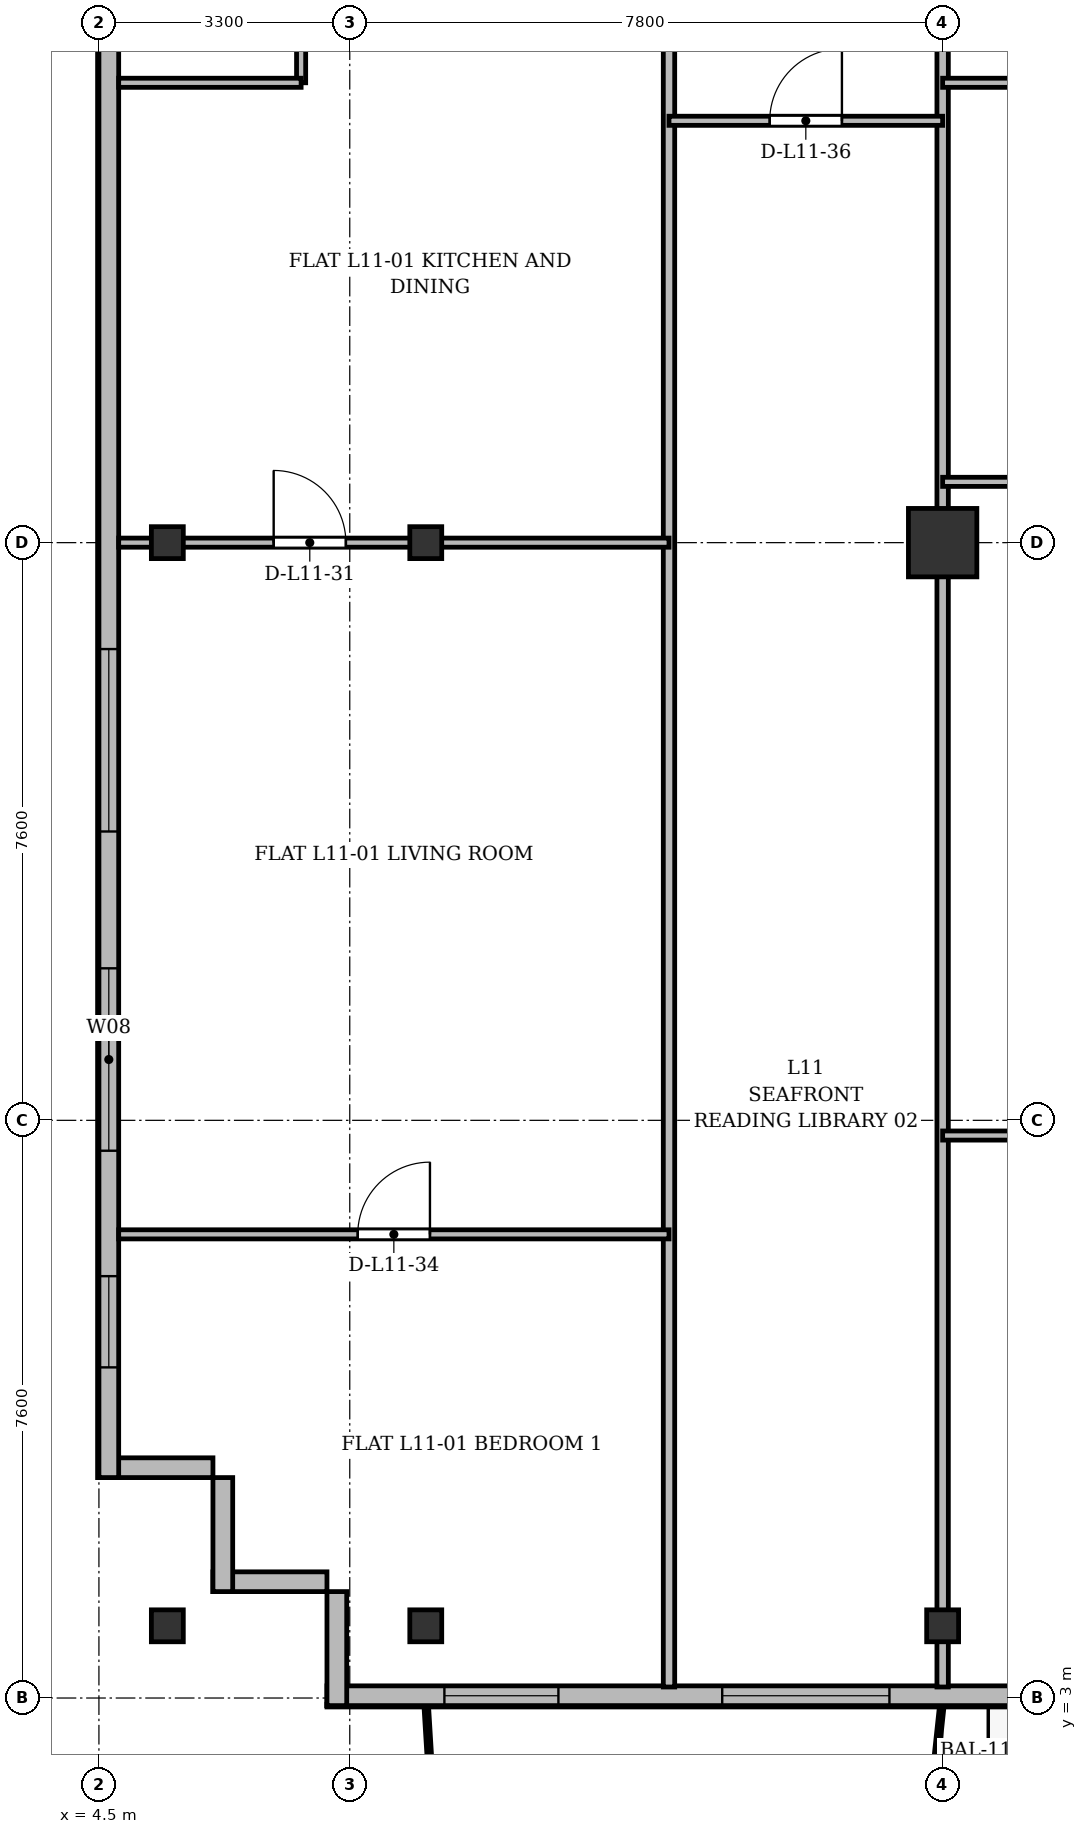
"""IFC4 building model, lengths in metres.
Left out: names, types, materials, properties, quantities, classifications, styles, units other than length and angle.
Written with IfcOpenShell. Run it as: python <this file> out.ifc"""

import sys

from ifc_helpers import new_model, si_unit, direction, frame, frame_2d, origin, origin_2d, place, context, subcontext, project, spatial, rectangle, i_section, extrude, source, transform, mapped, element, fill, save


model = new_model("IFC4")
c1 = context("Model", 3, precision=1e-05, world=origin(), true_north=direction((0.0, 1.0)))
c2 = subcontext(c1, "Body", "Model", "MODEL_VIEW")
j1 = project(units=[si_unit("LENGTHUNIT", "METRE"), si_unit("PLANEANGLEUNIT", "RADIAN")], contexts=[c1])
p1 = place(None, origin())
s1 = spatial("IfcSite", under=j1, at=p1, CompositionType="ELEMENT")
p2 = place(p1, origin())
s2 = spatial("IfcBuilding", under=s1, at=p2, CompositionType="ELEMENT")
p3 = place(p2, frame((0.0, 0.0, 45.1)))
s3 = spatial("IfcBuildingStorey", under=s2, at=p3, CompositionType="ELEMENT", Elevation=45.1)
m1 = source(origin(), c2, "Body", "SweptSolid", [
    extrude(i_section(OverallWidth=0.42, OverallDepth=0.42, WebThickness=0.026, FlangeThickness=0.04, at=origin_2d()), origin(), (0.0, 0.0, 1.0), 3.6),
])
for number, where, z_axis, x_axis in (
    (1, (5.4, 3.95, 0.0), (0.0, 0.0, 1.0), (1.0, 0.0, 0.0)),
    (2, (5.4, 18.2, 0.0), (0.0, 0.0, 1.0), (1.0, 0.0, 0.0)),
    (3, (8.8, 3.95, 0.0), (0.0, 0.0, 1.0), (1.0, 0.0, 0.0)),
    (4, (8.8, 18.2, 0.0), (0.0, 0.0, 1.0), (1.0, 0.0, 0.0)),
    (5, (15.6, 3.95, 0.0), (0.0, 0.0, 1.0), (1.0, 0.0, 0.0)),
):
    element("IfcColumn", number, at=place(p3, frame(where, z_axis=z_axis, x_axis=x_axis)), inside=s3, PredefinedType="COLUMN", context=c2, shape_type="MappedRepresentation", body=[
        mapped(m1, transform((0.0, 0.0, 0.0), x_axis=(1.0, 0.0, 0.0), y_axis=(0.0, 1.0, 0.0), z_axis=(0.0, 0.0, 1.0), scale=1.0)),
    ])
m2 = source(origin(), c2, "Body", "SweptSolid", [
    extrude(rectangle(XDim=0.9, YDim=0.9, at=origin_2d()), origin(), (0.0, 0.0, 1.0), 3.6),
])
p4 = place(p3, frame((15.6, 18.2, 0.0), z_axis=(0.0, 0.0, 1.0), x_axis=(1.0, 0.0, 0.0)))
e6 = element("IfcColumn", 6, at=p4, inside=s3, PredefinedType="COLUMN", context=c2, shape_type="MappedRepresentation", body=[
    mapped(m2, transform((0.0, 0.0, 0.0), x_axis=(1.0, 0.0, 0.0), y_axis=(0.0, 1.0, 0.0), z_axis=(0.0, 0.0, 1.0), scale=1.0)),
])
for number, where, z_axis, x_axis in (
    (7, (7.5, 4.53, 0.0), (0.0, 0.0, 1.0), (-1.0, 0.0, 0.0)),
    (8, (6.13, 4.4, 0.0), (0.0, 0.0, 1.0), (0.0, 1.0, 0.0)),
):
    element("IfcWall", number, at=place(p3, frame(where, z_axis=z_axis, x_axis=x_axis)), inside=s3, PredefinedType="SOLIDWALL", context=c2, shape_type="SweptSolid", body=[
        extrude(rectangle(XDim=1.5, YDim=0.26, at=frame_2d((0.75, 0.0))), origin(), (0.0, 0.0, 1.0), 3.34),
    ])
p5 = place(p3, frame((6.0, 6.03, 0.0), z_axis=(0.0, 0.0, 1.0), x_axis=(-1.0, 0.0, 0.0)))
e9 = element("IfcWall", 9, at=p5, inside=s3, PredefinedType="SOLIDWALL", context=c2, shape_type="SweptSolid", body=[
    extrude(rectangle(XDim=1.5, YDim=0.26, at=frame_2d((0.75, 0.0))), origin(), (0.0, 0.0, 1.0), 2.752),
])
p6 = place(p3, frame((4.63, 5.9, 0.0), z_axis=(0.0, 0.0, 1.0), x_axis=(0.0, 1.0, 0.0)))
e10 = element("IfcWall", 10, at=p6, inside=s3, PredefinedType="SOLIDWALL", context=c2, shape_type="SweptSolid", body=[
    extrude(rectangle(XDim=39.6, YDim=0.26, at=frame_2d((19.8, 0.0))), origin(), (0.0, 0.0, 1.0), 3.34),
])
p7 = place(p6, frame((1.45, 0.0, 0.92)))
e11 = element("IfcOpeningElement", 11, at=p7, cuts=e10, PredefinedType="OPENING", context=c2, shape_type="SweptSolid", body=[
    extrude(rectangle(XDim=1.2, YDim=1.65, at=frame_2d((0.6, 0.825))), frame((0.0, 0.14, 0.0), z_axis=(0.0, -1.0, 0.0), x_axis=(1.0, 0.0, 0.0)), (0.0, 0.0, 1.0), 0.28),
])
p8 = place(p6, frame((4.3, 0.0, 0.92)))
e12 = element("IfcOpeningElement", 12, at=p8, cuts=e10, PredefinedType="OPENING", context=c2, shape_type="SweptSolid", body=[
    extrude(rectangle(XDim=2.4, YDim=2.1, at=frame_2d((1.2, 1.05))), frame((0.0, 0.14, 0.0), z_axis=(0.0, -1.0, 0.0), x_axis=(1.0, 0.0, 0.0)), (0.0, 0.0, 1.0), 0.28),
])
p9 = place(p6, frame((8.5, 0.0, 0.92)))
e13 = element("IfcOpeningElement", 13, at=p9, cuts=e10, PredefinedType="OPENING", context=c2, shape_type="SweptSolid", body=[
    extrude(rectangle(XDim=2.4, YDim=2.1, at=frame_2d((1.2, 1.05))), frame((0.0, 0.14, 0.0), z_axis=(0.0, -1.0, 0.0), x_axis=(1.0, 0.0, 0.0)), (0.0, 0.0, 1.0), 0.28),
])
p10 = place(p6, frame((29.7, 0.0, 0.92)))
e14 = element("IfcOpeningElement", 14, at=p10, cuts=e10, PredefinedType="OPENING", context=c2, shape_type="SweptSolid", body=[
    extrude(rectangle(XDim=2.4, YDim=2.1, at=frame_2d((1.2, 1.05))), frame((0.0, 0.14, 0.0), z_axis=(0.0, -1.0, 0.0), x_axis=(1.0, 0.0, 0.0)), (0.0, 0.0, 1.0), 0.28),
])
p11 = place(p6, frame((33.9, 0.0, 0.92)))
e15 = element("IfcOpeningElement", 15, at=p11, cuts=e10, PredefinedType="OPENING", context=c2, shape_type="SweptSolid", body=[
    extrude(rectangle(XDim=1.2, YDim=1.65, at=frame_2d((0.6, 0.825))), frame((0.0, 0.14, 0.0), z_axis=(0.0, -1.0, 0.0), x_axis=(1.0, 0.0, 0.0)), (0.0, 0.0, 1.0), 0.28),
])
p12 = place(p6, frame((37.25, 0.0, 0.92)))
e16 = element("IfcOpeningElement", 16, at=p12, cuts=e10, PredefinedType="OPENING", context=c2, shape_type="SweptSolid", body=[
    extrude(rectangle(XDim=1.2, YDim=1.65, at=frame_2d((0.6, 0.825))), frame((0.0, 0.14, 0.0), z_axis=(0.0, -1.0, 0.0), x_axis=(1.0, 0.0, 0.0)), (0.0, 0.0, 1.0), 0.28),
])
p13 = place(p3, frame((66.9, 3.03, 0.0), z_axis=(0.0, 0.0, 1.0), x_axis=(-1.0, 0.0, 0.0)))
e17 = element("IfcWall", 17, at=p13, inside=s3, PredefinedType="SOLIDWALL", context=c2, shape_type="SweptSolid", body=[
    extrude(rectangle(XDim=59.4, YDim=0.26, at=frame_2d((29.7, 0.0))), origin(), (0.0, 0.0, 1.0), 3.34),
])
p14 = place(p13, frame((0.395, 0.0, 0.9)))
e18 = element("IfcOpeningElement", 18, at=p14, cuts=e17, PredefinedType="OPENING", context=c2, shape_type="SweptSolid", body=[
    extrude(rectangle(XDim=2.2, YDim=1.8, at=frame_2d((1.1, 0.9))), frame((0.0, 0.14, 0.0), z_axis=(0.0, -1.0, 0.0), x_axis=(1.0, 0.0, 0.0)), (0.0, 0.0, 1.0), 0.28),
])
p15 = place(p13, frame((4.75, 0.0, 0.9)))
e19 = element("IfcOpeningElement", 19, at=p15, cuts=e17, PredefinedType="OPENING", context=c2, shape_type="SweptSolid", body=[
    extrude(rectangle(XDim=1.5, YDim=1.75, at=frame_2d((0.75, 0.875))), frame((0.0, 0.14, 0.0), z_axis=(0.0, -1.0, 0.0), x_axis=(1.0, 0.0, 0.0)), (0.0, 0.0, 1.0), 0.28),
])
p16 = place(p13, frame((11.0, 0.0, 0.9)))
e20 = element("IfcOpeningElement", 20, at=p16, cuts=e17, PredefinedType="OPENING", context=c2, shape_type="SweptSolid", body=[
    extrude(rectangle(XDim=2.0, YDim=1.95, at=frame_2d((1.0, 0.975))), frame((0.0, 0.14, 0.0), z_axis=(0.0, -1.0, 0.0), x_axis=(1.0, 0.0, 0.0)), (0.0, 0.0, 1.0), 0.28),
])
p17 = place(p13, frame((17.007, 0.0, 0.0)))
e21 = element("IfcOpeningElement", 21, at=p17, cuts=e17, PredefinedType="OPENING", context=c2, shape_type="SweptSolid", body=[
    extrude(rectangle(XDim=1.2, YDim=2.2, at=frame_2d((0.6, 1.1))), frame((0.0, 0.14, 0.0), z_axis=(0.0, -1.0, 0.0), x_axis=(1.0, 0.0, 0.0)), (0.0, 0.0, 1.0), 0.28),
])
p18 = place(p13, frame((20.4, 0.0, 0.9)))
e22 = element("IfcOpeningElement", 22, at=p18, cuts=e17, PredefinedType="OPENING", context=c2, shape_type="SweptSolid", body=[
    extrude(rectangle(XDim=1.8, YDim=1.8, at=frame_2d((0.9, 0.9))), frame((0.0, 0.14, 0.0), z_axis=(0.0, -1.0, 0.0), x_axis=(1.0, 0.0, 0.0)), (0.0, 0.0, 1.0), 0.28),
])
p19 = place(p13, frame((24.4, 0.0, 0.9)))
e23 = element("IfcOpeningElement", 23, at=p19, cuts=e17, PredefinedType="OPENING", context=c2, shape_type="SweptSolid", body=[
    extrude(rectangle(XDim=2.2, YDim=1.8, at=frame_2d((1.1, 0.9))), frame((0.0, 0.14, 0.0), z_axis=(0.0, -1.0, 0.0), x_axis=(1.0, 0.0, 0.0)), (0.0, 0.0, 1.0), 0.28),
])
p20 = place(p13, frame((31.35, 0.0, 0.9)))
e24 = element("IfcOpeningElement", 24, at=p20, cuts=e17, PredefinedType="OPENING", context=c2, shape_type="SweptSolid", body=[
    extrude(rectangle(XDim=1.5, YDim=1.75, at=frame_2d((0.75, 0.875))), frame((0.0, 0.14, 0.0), z_axis=(0.0, -1.0, 0.0), x_axis=(1.0, 0.0, 0.0)), (0.0, 0.0, 1.0), 0.28),
])
p21 = place(p13, frame((38.9, 0.0, 0.9)))
e25 = element("IfcOpeningElement", 25, at=p21, cuts=e17, PredefinedType="OPENING", context=c2, shape_type="SweptSolid", body=[
    extrude(rectangle(XDim=2.0, YDim=1.95, at=frame_2d((1.0, 0.975))), frame((0.0, 0.14, 0.0), z_axis=(0.0, -1.0, 0.0), x_axis=(1.0, 0.0, 0.0)), (0.0, 0.0, 1.0), 0.28),
])
p22 = place(p13, frame((45.435, 0.0, 0.0)))
e26 = element("IfcOpeningElement", 26, at=p22, cuts=e17, PredefinedType="OPENING", context=c2, shape_type="SweptSolid", body=[
    extrude(rectangle(XDim=1.2, YDim=2.2, at=frame_2d((0.6, 1.1))), frame((0.0, 0.14, 0.0), z_axis=(0.0, -1.0, 0.0), x_axis=(1.0, 0.0, 0.0)), (0.0, 0.0, 1.0), 0.28),
])
p23 = place(p13, frame((48.45, 0.0, 0.9)))
e27 = element("IfcOpeningElement", 27, at=p23, cuts=e17, PredefinedType="OPENING", context=c2, shape_type="SweptSolid", body=[
    extrude(rectangle(XDim=1.8, YDim=1.8, at=frame_2d((0.9, 0.9))), frame((0.0, 0.14, 0.0), z_axis=(0.0, -1.0, 0.0), x_axis=(1.0, 0.0, 0.0)), (0.0, 0.0, 1.0), 0.28),
])
p24 = place(p13, frame((52.0, 0.0, 0.9)))
e28 = element("IfcOpeningElement", 28, at=p24, cuts=e17, PredefinedType="OPENING", context=c2, shape_type="SweptSolid", body=[
    extrude(rectangle(XDim=2.2, YDim=1.8, at=frame_2d((1.1, 0.9))), frame((0.0, 0.14, 0.0), z_axis=(0.0, -1.0, 0.0), x_axis=(1.0, 0.0, 0.0)), (0.0, 0.0, 1.0), 0.28),
])
p25 = place(p13, frame((56.355, 0.0, 0.9)))
e29 = element("IfcOpeningElement", 29, at=p25, cuts=e17, PredefinedType="OPENING", context=c2, shape_type="SweptSolid", body=[
    extrude(rectangle(XDim=1.5, YDim=1.75, at=frame_2d((0.75, 0.875))), frame((0.0, 0.14, 0.0), z_axis=(0.0, -1.0, 0.0), x_axis=(1.0, 0.0, 0.0)), (0.0, 0.0, 1.0), 0.28),
])
p26 = place(p3, frame((7.63, 2.9, 0.0), z_axis=(0.0, 0.0, 1.0), x_axis=(0.0, 1.0, 0.0)))
e30 = element("IfcWall", 30, at=p26, inside=s3, PredefinedType="SOLIDWALL", context=c2, shape_type="SweptSolid", body=[
    extrude(rectangle(XDim=1.5, YDim=0.26, at=frame_2d((0.75, 0.0))), origin(), (0.0, 0.0, 1.0), 2.69),
])
p27 = place(p3, frame((12.0, 3.145, 0.0), z_axis=(0.0, 0.0, 1.0), x_axis=(0.0, 1.0, 0.0)))
e31 = element("IfcWall", 31, at=p27, inside=s3, PredefinedType="PARTITIONING", context=c2, shape_type="SweptSolid", body=[
    extrude(rectangle(XDim=24.455, YDim=0.15, at=frame_2d((12.228, 0.0))), origin(), (0.0, 0.0, 1.0), 2.69),
])
p28 = place(p3, frame((15.6, 3.145, 0.0), z_axis=(0.0, 0.0, 1.0), x_axis=(0.0, 1.0, 0.0)))
e32 = element("IfcWall", 32, at=p28, inside=s3, PredefinedType="PARTITIONING", context=c2, shape_type="SweptSolid", body=[
    extrude(rectangle(XDim=24.455, YDim=0.15, at=frame_2d((12.228, 0.0))), origin(), (0.0, 0.0, 1.0), 2.752),
])
p29 = place(p3, frame((4.76, 18.2, 0.0), z_axis=(0.0, 0.0, 1.0), x_axis=(1.0, 0.0, 0.0)))
e33 = element("IfcWall", 33, at=p29, inside=s3, PredefinedType="PARTITIONING", context=c2, shape_type="SweptSolid", body=[
    extrude(rectangle(XDim=7.24, YDim=0.12, at=frame_2d((3.62, 0.0))), origin(), (0.0, 0.0, 1.0), 2.69),
])
p30 = place(p29, frame((2.039, 0.0, 0.0)))
e34 = element("IfcOpeningElement", 34, at=p30, cuts=e33, PredefinedType="OPENING", context=c2, shape_type="SweptSolid", body=[
    extrude(rectangle(XDim=0.95, YDim=2.15, at=frame_2d((0.475, 1.075))), frame((0.0, 0.07, 0.0), z_axis=(0.0, -1.0, 0.0), x_axis=(1.0, 0.0, 0.0)), (0.0, 0.0, 1.0), 0.14),
])
p31 = place(p3, frame((7.16, 24.25, 0.0), z_axis=(0.0, 0.0, 1.0), x_axis=(0.0, 1.0, 0.0)))
e35 = element("IfcWall", 35, at=p31, inside=s3, PredefinedType="PARTITIONING", context=c2, shape_type="SweptSolid", body=[
    extrude(rectangle(XDim=3.35, YDim=0.12, at=frame_2d((1.675, 0.0))), origin(), (0.0, 0.0, 1.0), 2.94),
])
p32 = place(p31, frame((0.8, 0.0, 0.0)))
e36 = element("IfcOpeningElement", 36, at=p32, cuts=e35, PredefinedType="OPENING", context=c2, shape_type="SweptSolid", body=[
    extrude(rectangle(XDim=0.85, YDim=2.1, at=frame_2d((0.425, 1.05))), frame((0.0, 0.07, 0.0), z_axis=(0.0, -1.0, 0.0), x_axis=(1.0, 0.0, 0.0)), (0.0, 0.0, 1.0), 0.14),
])
p33 = place(p3, frame((4.76, 24.25, 0.0), z_axis=(0.0, 0.0, 1.0), x_axis=(1.0, 0.0, 0.0)))
e37 = element("IfcWall", 37, at=p33, inside=s3, PredefinedType="PARTITIONING", context=c2, shape_type="SweptSolid", body=[
    extrude(rectangle(XDim=2.4, YDim=0.12, at=frame_2d((1.2, 0.0))), origin(), (0.0, 0.0, 1.0), 2.752),
])
p34 = place(p3, frame((4.76, 9.1, 0.0), z_axis=(0.0, 0.0, 1.0), x_axis=(1.0, 0.0, 0.0)))
e38 = element("IfcWall", 38, at=p34, inside=s3, PredefinedType="PARTITIONING", context=c2, shape_type="SweptSolid", body=[
    extrude(rectangle(XDim=7.24, YDim=0.12, at=frame_2d((3.62, 0.0))), origin(), (0.0, 0.0, 1.0), 2.752),
])
p35 = place(p34, frame((3.145, 0.0, 0.0)))
e39 = element("IfcOpeningElement", 39, at=p35, cuts=e38, PredefinedType="OPENING", context=c2, shape_type="SweptSolid", body=[
    extrude(rectangle(XDim=0.95, YDim=2.15, at=frame_2d((0.475, 1.075))), frame((0.0, 0.07, 0.0), z_axis=(0.0, -1.0, 0.0), x_axis=(1.0, 0.0, 0.0)), (0.0, 0.0, 1.0), 0.14),
])
p36 = place(p3, frame((12.0, 23.75, 0.0), z_axis=(0.0, 0.0, 1.0), x_axis=(1.0, 0.0, 0.0)))
e40 = element("IfcWall", 40, at=p36, inside=s3, PredefinedType="PARTITIONING", context=c2, shape_type="SweptSolid", body=[
    extrude(rectangle(XDim=3.6, YDim=0.12, at=frame_2d((1.8, 0.0))), origin(), (0.0, 0.0, 1.0), 2.752),
])
p37 = place(p36, frame((1.325, 0.0, 0.0)))
e41 = element("IfcOpeningElement", 41, at=p37, cuts=e40, PredefinedType="OPENING", context=c2, shape_type="SweptSolid", body=[
    extrude(rectangle(XDim=0.95, YDim=2.15, at=frame_2d((0.475, 1.075))), frame((0.0, 0.07, 0.0), z_axis=(0.0, -1.0, 0.0), x_axis=(1.0, 0.0, 0.0)), (0.0, 0.0, 1.0), 0.14),
])
p38 = place(p3, frame((15.6, 19.0, 0.0), z_axis=(0.0, 0.0, 1.0), x_axis=(1.0, 0.0, 0.0)))
e42 = element("IfcWall", 42, at=p38, inside=s3, PredefinedType="PARTITIONING", context=c2, shape_type="SweptSolid", body=[
    extrude(rectangle(XDim=7.8, YDim=0.12, at=frame_2d((3.9, 0.0))), origin(), (0.0, 0.0, 1.0), 2.752),
])
p39 = place(p38, frame((3.333, 0.0, 0.0)))
e43 = element("IfcOpeningElement", 43, at=p39, cuts=e42, PredefinedType="OPENING", context=c2, shape_type="SweptSolid", body=[
    extrude(rectangle(XDim=0.95, YDim=2.15, at=frame_2d((0.475, 1.075))), frame((0.0, 0.07, 0.0), z_axis=(0.0, -1.0, 0.0), x_axis=(1.0, 0.0, 0.0)), (0.0, 0.0, 1.0), 0.14),
])
p40 = place(p3, frame((15.6, 24.25, 0.0), z_axis=(0.0, 0.0, 1.0), x_axis=(1.0, 0.0, 0.0)))
e44 = element("IfcWall", 44, at=p40, inside=s3, PredefinedType="PARTITIONING", context=c2, shape_type="SweptSolid", body=[
    extrude(rectangle(XDim=2.4, YDim=0.12, at=frame_2d((1.2, 0.0))), origin(), (0.0, 0.0, 1.0), 2.752),
])
p41 = place(p3, frame((15.6, 10.4, 0.0), z_axis=(0.0, 0.0, 1.0), x_axis=(1.0, 0.0, 0.0)))
e45 = element("IfcWall", 45, at=p41, inside=s3, PredefinedType="PARTITIONING", context=c2, shape_type="SweptSolid", body=[
    extrude(rectangle(XDim=3.9, YDim=0.12, at=frame_2d((1.95, 0.0))), origin(), (0.0, 0.0, 1.0), 2.752),
])
p42 = place(p41, frame((1.475, 0.0, 0.0)))
e46 = element("IfcOpeningElement", 46, at=p42, cuts=e45, PredefinedType="OPENING", context=c2, shape_type="SweptSolid", body=[
    extrude(rectangle(XDim=0.95, YDim=2.15, at=frame_2d((0.475, 1.075))), frame((0.0, 0.07, 0.0), z_axis=(0.0, -1.0, 0.0), x_axis=(1.0, 0.0, 0.0)), (0.0, 0.0, 1.0), 0.14),
])
m3 = source(origin(), c2, "Body", "SweptSolid", [
    extrude(rectangle(XDim=1.2, YDim=1.65, at=frame_2d((0.6, 0.825))), frame((0.0, 0.03, 0.0), z_axis=(0.0, -1.0, 0.0), x_axis=(1.0, 0.0, 0.0)), (0.0, 0.0, 1.0), 0.06),
])
p43 = place(p7, origin())
e47 = element("IfcWindow", 47, at=p43, inside=s3, PartitioningType="SINGLE_PANEL", PredefinedType="WINDOW", context=c2, shape_type="MappedRepresentation", body=[
    mapped(m3, transform((0.0, 0.0, 0.0), x_axis=(1.0, 0.0, 0.0), y_axis=(0.0, 1.0, 0.0), z_axis=(0.0, 0.0, 1.0), scale=1.0)),
])
fill(e11, e47)
m4 = source(origin(), c2, "Body", "SweptSolid", [
    extrude(rectangle(XDim=2.4, YDim=2.1, at=frame_2d((1.2, 1.05))), frame((0.0, 0.03, 0.0), z_axis=(0.0, -1.0, 0.0), x_axis=(1.0, 0.0, 0.0)), (0.0, 0.0, 1.0), 0.06),
])
p44 = place(p8, origin())
e48 = element("IfcWindow", 48, at=p44, inside=s3, PartitioningType="SINGLE_PANEL", PredefinedType="WINDOW", context=c2, shape_type="MappedRepresentation", body=[
    mapped(m4, transform((0.0, 0.0, 0.0), x_axis=(1.0, 0.0, 0.0), y_axis=(0.0, 1.0, 0.0), z_axis=(0.0, 0.0, 1.0), scale=1.0)),
])
fill(e12, e48)
p45 = place(p9, origin())
e49 = element("IfcWindow", 49, at=p45, inside=s3, PartitioningType="SINGLE_PANEL", PredefinedType="WINDOW", context=c2, shape_type="MappedRepresentation", body=[
    mapped(m4, transform((0.0, 0.0, 0.0), x_axis=(1.0, 0.0, 0.0), y_axis=(0.0, 1.0, 0.0), z_axis=(0.0, 0.0, 1.0), scale=1.0)),
])
fill(e13, e49)
m5 = source(origin(), c2, "Body", "SweptSolid", [
    extrude(rectangle(XDim=2.2, YDim=1.8, at=frame_2d((1.1, 0.9))), frame((0.0, 0.03, 0.0), z_axis=(0.0, -1.0, 0.0), x_axis=(1.0, 0.0, 0.0)), (0.0, 0.0, 1.0), 0.06),
])
p46 = place(p24, origin())
e50 = element("IfcWindow", 50, at=p46, inside=s3, PartitioningType="SINGLE_PANEL", PredefinedType="WINDOW", context=c2, shape_type="MappedRepresentation", body=[
    mapped(m5, transform((0.0, 0.0, 0.0), x_axis=(1.0, 0.0, 0.0), y_axis=(0.0, 1.0, 0.0), z_axis=(0.0, 0.0, 1.0), scale=1.0)),
])
fill(e28, e50)
m6 = source(origin(), c2, "Body", "SweptSolid", [
    extrude(rectangle(XDim=1.5, YDim=1.75, at=frame_2d((0.75, 0.875))), frame((0.0, 0.03, 0.0), z_axis=(0.0, -1.0, 0.0), x_axis=(1.0, 0.0, 0.0)), (0.0, 0.0, 1.0), 0.06),
])
p47 = place(p25, origin())
e51 = element("IfcWindow", 51, at=p47, inside=s3, PartitioningType="SINGLE_PANEL", PredefinedType="WINDOW", context=c2, shape_type="MappedRepresentation", body=[
    mapped(m6, transform((0.0, 0.0, 0.0), x_axis=(1.0, 0.0, 0.0), y_axis=(0.0, 1.0, 0.0), z_axis=(0.0, 0.0, 1.0), scale=1.0)),
])
fill(e29, e51)
m7 = source(origin(), c2, "Body", "SweptSolid", [
    extrude(rectangle(XDim=0.95, YDim=2.15, at=frame_2d((0.475, 1.075))), frame((0.0, 0.025, 0.0), z_axis=(0.0, -1.0, 0.0), x_axis=(1.0, 0.0, 0.0)), (0.0, 0.0, 1.0), 0.05),
])
p48 = place(p30, origin())
e52 = element("IfcDoor", 52, at=p48, inside=s3, OperationType="SINGLE_SWING_LEFT", PredefinedType="DOOR", context=c2, shape_type="MappedRepresentation", body=[
    mapped(m7, transform((0.0, 0.0, 0.0), x_axis=(1.0, 0.0, 0.0), y_axis=(0.0, 1.0, 0.0), z_axis=(0.0, 0.0, 1.0), scale=1.0)),
])
fill(e34, e52)
p49 = place(p35, origin())
e53 = element("IfcDoor", 53, at=p49, inside=s3, OperationType="SINGLE_SWING_RIGHT", PredefinedType="DOOR", context=c2, shape_type="MappedRepresentation", body=[
    mapped(m7, transform((0.0, 0.0, 0.0), x_axis=(1.0, 0.0, 0.0), y_axis=(0.0, 1.0, 0.0), z_axis=(0.0, 0.0, 1.0), scale=1.0)),
])
fill(e39, e53)
p50 = place(p37, origin())
e54 = element("IfcDoor", 54, at=p50, inside=s3, OperationType="SINGLE_SWING_RIGHT", PredefinedType="DOOR", context=c2, shape_type="MappedRepresentation", body=[
    mapped(m7, transform((0.0, 0.0, 0.0), x_axis=(1.0, 0.0, 0.0), y_axis=(0.0, 1.0, 0.0), z_axis=(0.0, 0.0, 1.0), scale=1.0)),
])
fill(e41, e54)
save(model, sys.argv[1])
